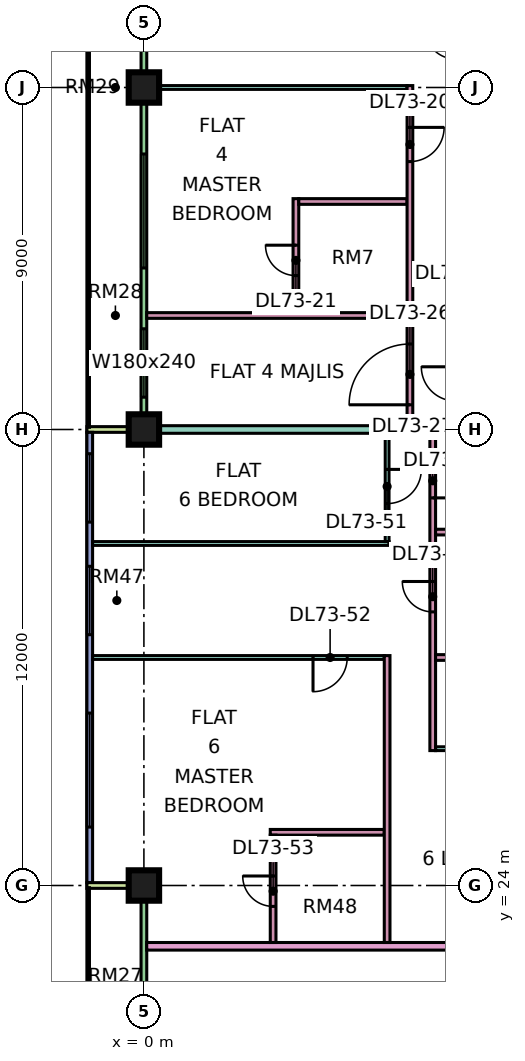
"""IFC4 building model, lengths in metres.
Left out: names, types, materials, properties, quantities, classifications, styles, units other than length and angle.
Written with IfcOpenShell. Run it as: python <this file> out.ifc"""

import sys

from ifc_helpers import new_model, si_unit, direction, frame, frame_2d, origin, origin_2d, place, context, subcontext, project, spatial, rectangle, extrude, element, fill, save


model = new_model("IFC4")
c1 = context("Model", 3, precision=1e-05, world=origin(), true_north=direction((0.0, 1.0)))
c2 = subcontext(c1, "Body", "Model", "MODEL_VIEW")
j1 = project(units=[si_unit("LENGTHUNIT", "METRE"), si_unit("PLANEANGLEUNIT", "RADIAN")], contexts=[c1])
p1 = place(None, origin())
s1 = spatial("IfcSite", under=j1, at=p1, CompositionType="ELEMENT")
p2 = place(p1, origin())
s2 = spatial("IfcBuilding", under=s1, at=p2, CompositionType="ELEMENT")
p3 = place(p2, frame((0.0, 0.0, 310.9)))
s3 = spatial("IfcBuildingStorey", under=s2, at=p3, CompositionType="ELEMENT", Elevation=310.9)
p4 = place(p3, frame((0.0, 24.0, 0.0), z_axis=(0.0, 0.0, 1.0), x_axis=(1.0, 0.0, 0.0)))
e1 = element("IfcColumn", 1, at=p4, inside=s3, PredefinedType="COLUMN", context=c2, shape_type="SweptSolid", body=[
    extrude(rectangle(XDim=0.8, YDim=0.8, at=origin_2d()), origin(), (0.0, 0.0, 1.0), 3.75),
])
p5 = place(p3, frame((0.0, 36.0, 0.0), z_axis=(0.0, 0.0, 1.0), x_axis=(1.0, 0.0, 0.0)))
e2 = element("IfcColumn", 2, at=p5, inside=s3, PredefinedType="COLUMN", context=c2, shape_type="SweptSolid", body=[
    extrude(rectangle(XDim=0.8, YDim=0.8, at=origin_2d()), origin(), (0.0, 0.0, 1.0), 3.75),
])
p6 = place(p3, frame((0.0, 45.0, 0.0), z_axis=(0.0, 0.0, 1.0), x_axis=(1.0, 0.0, 0.0)))
e3 = element("IfcColumn", 3, at=p6, inside=s3, PredefinedType="COLUMN", context=c2, shape_type="SweptSolid", body=[
    extrude(rectangle(XDim=0.8, YDim=0.8, at=origin_2d()), origin(), (0.0, 0.0, 1.0), 3.75),
])
p7 = place(p3, frame((0.0, 47.925, 0.0), z_axis=(0.0, 0.0, 1.0), x_axis=(0.0, -1.0, 0.0)))
e4 = element("IfcWall", 4, at=p7, inside=s3, PredefinedType="SOLIDWALL", context=c2, shape_type="SweptSolid", body=[
    extrude(rectangle(XDim=11.85, YDim=0.15, at=frame_2d((5.925, 0.0))), origin(), (0.0, 0.0, 1.0), 3.35),
])
p8 = place(p7, frame((0.613, 0.0, 0.0)))
e5 = element("IfcOpeningElement", 5, at=p8, cuts=e4, PredefinedType="OPENING", context=c2, shape_type="SweptSolid", body=[
    extrude(rectangle(XDim=1.2, YDim=2.4, at=frame_2d((0.6, 1.2))), frame((0.0, 0.085, 0.0), z_axis=(0.0, -1.0, 0.0), x_axis=(1.0, 0.0, 0.0)), (0.0, 0.0, 1.0), 0.17),
])
p9 = place(p7, frame((4.675, 0.0, 0.45)))
e6 = element("IfcOpeningElement", 6, at=p9, cuts=e4, PredefinedType="OPENING", context=c2, shape_type="SweptSolid", body=[
    extrude(rectangle(XDim=3.0, YDim=2.4, at=frame_2d((1.5, 1.2))), frame((0.0, 0.085, 0.0), z_axis=(0.0, -1.0, 0.0), x_axis=(1.0, 0.0, 0.0)), (0.0, 0.0, 1.0), 0.17),
])
p10 = place(p7, frame((9.275, 0.0, 0.45)))
e7 = element("IfcOpeningElement", 7, at=p10, cuts=e4, PredefinedType="OPENING", context=c2, shape_type="SweptSolid", body=[
    extrude(rectangle(XDim=1.8, YDim=2.4, at=frame_2d((0.9, 1.2))), frame((0.0, 0.085, 0.0), z_axis=(0.0, -1.0, 0.0), x_axis=(1.0, 0.0, 0.0)), (0.0, 0.0, 1.0), 0.17),
])
p11 = place(p3, frame((-1.5, 36.0, 0.0), z_axis=(0.0, 0.0, 1.0), x_axis=(1.0, 0.0, 0.0)))
e8 = element("IfcWall", 8, at=p11, inside=s3, PredefinedType="SOLIDWALL", context=c2, shape_type="SweptSolid", body=[
    extrude(rectangle(XDim=1.5, YDim=0.15, at=frame_2d((0.75, 0.0))), origin(), (0.0, 0.0, 1.0), 3.35),
])
p12 = place(p3, frame((-1.425, 35.925, 0.0), z_axis=(0.0, 0.0, 1.0), x_axis=(0.0, -1.0, 0.0)))
e9 = element("IfcWall", 9, at=p12, inside=s3, PredefinedType="SOLIDWALL", context=c2, shape_type="SweptSolid", body=[
    extrude(rectangle(XDim=11.85, YDim=0.15, at=frame_2d((5.925, 0.0))), origin(), (0.0, 0.0, 1.0), 3.35),
])
p13 = place(p12, frame((0.562, 0.0, 0.45)))
e10 = element("IfcOpeningElement", 10, at=p13, cuts=e9, PredefinedType="OPENING", context=c2, shape_type="SweptSolid", body=[
    extrude(rectangle(XDim=1.8, YDim=2.4, at=frame_2d((0.9, 1.2))), frame((0.0, 0.085, 0.0), z_axis=(0.0, -1.0, 0.0), x_axis=(1.0, 0.0, 0.0)), (0.0, 0.0, 1.0), 0.17),
])
p14 = place(p12, frame((3.525, 0.0, 0.45)))
e11 = element("IfcOpeningElement", 11, at=p14, cuts=e9, PredefinedType="OPENING", context=c2, shape_type="SweptSolid", body=[
    extrude(rectangle(XDim=1.8, YDim=2.4, at=frame_2d((0.9, 1.2))), frame((0.0, 0.085, 0.0), z_axis=(0.0, -1.0, 0.0), x_axis=(1.0, 0.0, 0.0)), (0.0, 0.0, 1.0), 0.17),
])
p15 = place(p12, frame((7.387, 0.0, 0.45)))
e12 = element("IfcOpeningElement", 12, at=p15, cuts=e9, PredefinedType="OPENING", context=c2, shape_type="SweptSolid", body=[
    extrude(rectangle(XDim=3.0, YDim=2.4, at=frame_2d((1.5, 1.2))), frame((0.0, 0.085, 0.0), z_axis=(0.0, -1.0, 0.0), x_axis=(1.0, 0.0, 0.0)), (0.0, 0.0, 1.0), 0.17),
])
p16 = place(p3, frame((0.0, 23.925, 0.0), z_axis=(0.0, 0.0, 1.0), x_axis=(0.0, -1.0, 0.0)))
e13 = element("IfcWall", 13, at=p16, inside=s3, PredefinedType="SOLIDWALL", context=c2, shape_type="SweptSolid", body=[
    extrude(rectangle(XDim=11.35, YDim=0.15, at=frame_2d((5.675, 0.0))), origin(), (0.0, 0.0, 1.0), 3.35),
])
p17 = place(p16, frame((6.738, 0.0, 0.0)))
e14 = element("IfcOpeningElement", 14, at=p17, cuts=e13, PredefinedType="OPENING", context=c2, shape_type="SweptSolid", body=[
    extrude(rectangle(XDim=1.8, YDim=2.4, at=frame_2d((0.9, 1.2))), frame((0.0, 0.085, 0.0), z_axis=(0.0, -1.0, 0.0), x_axis=(1.0, 0.0, 0.0)), (0.0, 0.0, 1.0), 0.17),
])
p18 = place(p3, frame((-1.5, 24.0, 0.0), z_axis=(0.0, 0.0, 1.0), x_axis=(1.0, 0.0, 0.0)))
e15 = element("IfcWall", 15, at=p18, inside=s3, PredefinedType="SOLIDWALL", context=c2, shape_type="SweptSolid", body=[
    extrude(rectangle(XDim=1.5, YDim=0.15, at=frame_2d((0.75, 0.0))), origin(), (0.0, 0.0, 1.0), 3.35),
])
p19 = place(p3, frame((-1.35, 30.0, 0.0), z_axis=(0.0, 0.0, 1.0), x_axis=(1.0, 0.0, 0.0)))
e16 = element("IfcWall", 16, at=p19, inside=s3, PredefinedType="PARTITIONING", context=c2, shape_type="SweptSolid", body=[
    extrude(rectangle(XDim=7.675, YDim=0.1, at=frame_2d((3.837, 0.0))), origin(), (0.0, 0.0, 1.0), 3.35),
])
p20 = place(p19, frame((5.8, 0.0, 0.0)))
e17 = element("IfcOpeningElement", 17, at=p20, cuts=e16, PredefinedType="OPENING", context=c2, shape_type="SweptSolid", body=[
    extrude(rectangle(XDim=0.9, YDim=2.1, at=frame_2d((0.45, 1.05))), frame((0.0, 0.06, 0.0), z_axis=(0.0, -1.0, 0.0), x_axis=(1.0, 0.0, 0.0)), (0.0, 0.0, 1.0), 0.12),
])
p21 = place(p3, frame((-1.35, 33.0, 0.0), z_axis=(0.0, 0.0, 1.0), x_axis=(1.0, 0.0, 0.0)))
e18 = element("IfcWall", 18, at=p21, inside=s3, PredefinedType="PARTITIONING", context=c2, shape_type="SweptSolid", body=[
    extrude(rectangle(XDim=7.8, YDim=0.1, at=frame_2d((3.9, 0.0))), origin(), (0.0, 0.0, 1.0), 3.35),
])
e19 = element("IfcWall", 19, at=p5, inside=s3, PredefinedType="PARTITIONING", context=c2, shape_type="SweptSolid", body=[
    extrude(rectangle(XDim=12.3, YDim=0.2, at=frame_2d((6.15, 0.0))), origin(), (0.0, 0.0, 1.0), 3.35),
])
p22 = place(p3, frame((0.074, 22.4, 0.0), z_axis=(0.0, 0.0, 1.0), x_axis=(1.0, 0.0, 0.0)))
e20 = element("IfcWall", 20, at=p22, inside=s3, PredefinedType="PARTITIONING", context=c2, shape_type="SweptSolid", body=[
    extrude(rectangle(XDim=12.226, YDim=0.2, at=frame_2d((6.113, 0.0))), origin(), (0.0, 0.0, 1.0), 3.35),
])
p23 = place(p3, frame((0.074, 39.0, 0.0), z_axis=(0.0, 0.0, 1.0), x_axis=(1.0, 0.0, 0.0)))
e21 = element("IfcWall", 21, at=p23, inside=s3, PredefinedType="PARTITIONING", context=c2, shape_type="SweptSolid", body=[
    extrude(rectangle(XDim=6.851, YDim=0.15, at=frame_2d((3.426, 0.0))), origin(), (0.0, 0.0, 1.0), 3.35),
])
p24 = place(p3, frame((0.074, 45.0, 0.0), z_axis=(0.0, 0.0, 1.0), x_axis=(1.0, 0.0, 0.0)))
e22 = element("IfcWall", 22, at=p24, inside=s3, PredefinedType="PARTITIONING", context=c2, shape_type="SweptSolid", body=[
    extrude(rectangle(XDim=6.851, YDim=0.1, at=frame_2d((3.426, 0.0))), origin(), (0.0, 0.0, 1.0), 3.35),
])
p25 = place(p3, frame((3.325, 25.4, 0.0), z_axis=(0.0, 0.0, 1.0), x_axis=(1.0, 0.0, 0.0)))
e23 = element("IfcWall", 23, at=p25, inside=s3, PredefinedType="PARTITIONING", context=c2, shape_type="SweptSolid", body=[
    extrude(rectangle(XDim=3.0, YDim=0.15, at=frame_2d((1.5, 0.0))), origin(), (0.0, 0.0, 1.0), 3.35),
])
p26 = place(p3, frame((3.4, 22.5, 0.0), z_axis=(0.0, 0.0, 1.0), x_axis=(0.0, 1.0, 0.0)))
e24 = element("IfcWall", 24, at=p26, inside=s3, PredefinedType="PARTITIONING", context=c2, shape_type="SweptSolid", body=[
    extrude(rectangle(XDim=2.825, YDim=0.15, at=frame_2d((1.413, 0.0))), origin(), (0.0, 0.0, 1.0), 3.35),
])
p27 = place(p26, frame((0.95, 0.0, 0.0)))
e25 = element("IfcOpeningElement", 25, at=p27, cuts=e24, PredefinedType="OPENING", context=c2, shape_type="SweptSolid", body=[
    extrude(rectangle(XDim=0.8, YDim=2.1, at=frame_2d((0.4, 1.05))), frame((0.0, 0.085, 0.0), z_axis=(0.0, -1.0, 0.0), x_axis=(1.0, 0.0, 0.0)), (0.0, 0.0, 1.0), 0.17),
])
p28 = place(p3, frame((4.0, 39.075, 0.0), z_axis=(0.0, 0.0, 1.0), x_axis=(0.0, 1.0, 0.0)))
e26 = element("IfcWall", 26, at=p28, inside=s3, PredefinedType="PARTITIONING", context=c2, shape_type="SweptSolid", body=[
    extrude(rectangle(XDim=3.0, YDim=0.15, at=frame_2d((1.5, 0.0))), origin(), (0.0, 0.0, 1.0), 3.35),
])
p29 = place(p28, frame((0.975, 0.0, 0.0)))
e27 = element("IfcOpeningElement", 27, at=p29, cuts=e26, PredefinedType="OPENING", context=c2, shape_type="SweptSolid", body=[
    extrude(rectangle(XDim=0.8, YDim=2.1, at=frame_2d((0.4, 1.05))), frame((0.0, 0.085, 0.0), z_axis=(0.0, -1.0, 0.0), x_axis=(1.0, 0.0, 0.0)), (0.0, 0.0, 1.0), 0.17),
])
p30 = place(p3, frame((4.075, 42.0, 0.0), z_axis=(0.0, 0.0, 1.0), x_axis=(1.0, 0.0, 0.0)))
e28 = element("IfcWall", 28, at=p30, inside=s3, PredefinedType="PARTITIONING", context=c2, shape_type="SweptSolid", body=[
    extrude(rectangle(XDim=2.85, YDim=0.15, at=frame_2d((1.425, 0.0))), origin(), (0.0, 0.0, 1.0), 3.35),
])
p31 = place(p3, frame((6.4, 22.5, 0.0), z_axis=(0.0, 0.0, 1.0), x_axis=(0.0, 1.0, 0.0)))
e29 = element("IfcWall", 29, at=p31, inside=s3, PredefinedType="PARTITIONING", context=c2, shape_type="SweptSolid", body=[
    extrude(rectangle(XDim=7.55, YDim=0.15, at=frame_2d((3.775, 0.0))), origin(), (0.0, 0.0, 1.0), 3.35),
])
p32 = place(p3, frame((6.4, 33.05, 0.0), z_axis=(0.0, 0.0, 1.0), x_axis=(0.0, 1.0, 0.0)))
e30 = element("IfcWall", 30, at=p32, inside=s3, PredefinedType="PARTITIONING", context=c2, shape_type="SweptSolid", body=[
    extrude(rectangle(XDim=2.85, YDim=0.1, at=frame_2d((1.425, 0.0))), origin(), (0.0, 0.0, 1.0), 3.35),
])
p33 = place(p32, frame((1.0, 0.0, 0.0)))
e31 = element("IfcOpeningElement", 31, at=p33, cuts=e30, PredefinedType="OPENING", context=c2, shape_type="SweptSolid", body=[
    extrude(rectangle(XDim=0.9, YDim=2.1, at=frame_2d((0.45, 1.05))), frame((0.0, 0.06, 0.0), z_axis=(0.0, -1.0, 0.0), x_axis=(1.0, 0.0, 0.0)), (0.0, 0.0, 1.0), 0.12),
])
p34 = place(p3, frame((7.0, 36.1, 0.0), z_axis=(0.0, 0.0, 1.0), x_axis=(0.0, 1.0, 0.0)))
e32 = element("IfcWall", 32, at=p34, inside=s3, PredefinedType="PARTITIONING", context=c2, shape_type="SweptSolid", body=[
    extrude(rectangle(XDim=8.95, YDim=0.15, at=frame_2d((4.475, 0.0))), origin(), (0.0, 0.0, 1.0), 3.35),
])
p35 = place(p34, frame((6.95, 0.0, 0.0)))
e33 = element("IfcOpeningElement", 33, at=p35, cuts=e32, PredefinedType="OPENING", context=c2, shape_type="SweptSolid", body=[
    extrude(rectangle(XDim=0.9, YDim=2.1, at=frame_2d((0.45, 1.05))), frame((0.0, 0.085, 0.0), z_axis=(0.0, -1.0, 0.0), x_axis=(1.0, 0.0, 0.0)), (0.0, 0.0, 1.0), 0.17),
])
p36 = place(p34, frame((0.55, 0.0, 0.0)))
e34 = element("IfcOpeningElement", 34, at=p36, cuts=e32, PredefinedType="OPENING", context=c2, shape_type="SweptSolid", body=[
    extrude(rectangle(XDim=1.6, YDim=2.1, at=frame_2d((0.8, 1.05))), frame((0.0, 0.085, 0.0), z_axis=(0.0, -1.0, 0.0), x_axis=(1.0, 0.0, 0.0)), (0.0, 0.0, 1.0), 0.17),
])
p37 = place(p3, frame((7.6, 27.55, 0.0), z_axis=(0.0, 0.0, 1.0), x_axis=(0.0, 1.0, 0.0)))
e35 = element("IfcWall", 35, at=p37, inside=s3, PredefinedType="PARTITIONING", context=c2, shape_type="SweptSolid", body=[
    extrude(rectangle(XDim=8.35, YDim=0.15, at=frame_2d((4.175, 0.0))), origin(), (0.0, 0.0, 1.0), 3.35),
])
p38 = place(p37, frame((3.65, 0.0, 0.0)))
e36 = element("IfcOpeningElement", 36, at=p38, cuts=e35, PredefinedType="OPENING", context=c2, shape_type="SweptSolid", body=[
    extrude(rectangle(XDim=0.8, YDim=2.1, at=frame_2d((0.4, 1.05))), frame((0.0, 0.085, 0.0), z_axis=(0.0, -1.0, 0.0), x_axis=(1.0, 0.0, 0.0)), (0.0, 0.0, 1.0), 0.17),
])
p39 = place(p37, frame((6.65, 0.0, 0.0)))
e37 = element("IfcOpeningElement", 37, at=p39, cuts=e35, PredefinedType="OPENING", context=c2, shape_type="SweptSolid", body=[
    extrude(rectangle(XDim=0.9, YDim=2.1, at=frame_2d((0.45, 1.05))), frame((0.0, 0.085, 0.0), z_axis=(0.0, -1.0, 0.0), x_axis=(1.0, 0.0, 0.0)), (0.0, 0.0, 1.0), 0.17),
])
p40 = place(p3, frame((7.675, 27.6, 0.0), z_axis=(0.0, 0.0, 1.0), x_axis=(1.0, 0.0, 0.0)))
e38 = element("IfcWall", 38, at=p40, inside=s3, PredefinedType="PARTITIONING", context=c2, shape_type="SweptSolid", body=[
    extrude(rectangle(XDim=4.625, YDim=0.1, at=frame_2d((2.312, 0.0))), origin(), (0.0, 0.0, 1.0), 3.35),
])
p41 = place(p40, frame((1.875, 0.0, 0.0)))
e39 = element("IfcOpeningElement", 39, at=p41, cuts=e38, PredefinedType="OPENING", context=c2, shape_type="SweptSolid", body=[
    extrude(rectangle(XDim=0.9, YDim=2.1, at=frame_2d((0.45, 1.05))), frame((0.0, 0.06, 0.0), z_axis=(0.0, -1.0, 0.0), x_axis=(1.0, 0.0, 0.0)), (0.0, 0.0, 1.0), 0.12),
])
for number, where, z_axis, x_axis in (
    (40, (7.675, 30.0, 0.0), (0.0, 0.0, 1.0), (1.0, 0.0, 0.0)),
    (41, (7.675, 33.3, 0.0), (0.0, 0.0, 1.0), (1.0, 0.0, 0.0)),
):
    element("IfcWall", number, at=place(p3, frame(where, z_axis=z_axis, x_axis=x_axis)), inside=s3, PredefinedType="PARTITIONING", context=c2, shape_type="SweptSolid", body=[
        extrude(rectangle(XDim=4.625, YDim=0.15, at=frame_2d((2.312, 0.0))), origin(), (0.0, 0.0, 1.0), 3.35),
    ])
p42 = place(p9, origin())
e42 = element("IfcWindow", 42, at=p42, inside=s3, PartitioningType="SINGLE_PANEL", PredefinedType="WINDOW", context=c2, shape_type="SweptSolid", body=[
    extrude(rectangle(XDim=3.0, YDim=2.4, at=frame_2d((1.5, 1.2))), frame((0.0, 0.03, 0.0), z_axis=(0.0, -1.0, 0.0), x_axis=(1.0, 0.0, 0.0)), (0.0, 0.0, 1.0), 0.06),
])
fill(e6, e42)
p43 = place(p10, origin())
e43 = element("IfcWindow", 43, at=p43, inside=s3, PartitioningType="SINGLE_PANEL", PredefinedType="WINDOW", context=c2, shape_type="SweptSolid", body=[
    extrude(rectangle(XDim=1.8, YDim=2.4, at=frame_2d((0.9, 1.2))), frame((0.0, 0.03, 0.0), z_axis=(0.0, -1.0, 0.0), x_axis=(1.0, 0.0, 0.0)), (0.0, 0.0, 1.0), 0.06),
])
fill(e7, e43)
p44 = place(p13, origin())
e44 = element("IfcWindow", 44, at=p44, inside=s3, PartitioningType="SINGLE_PANEL", PredefinedType="WINDOW", context=c2, shape_type="SweptSolid", body=[
    extrude(rectangle(XDim=1.8, YDim=2.4, at=frame_2d((0.9, 1.2))), frame((0.0, 0.03, 0.0), z_axis=(0.0, -1.0, 0.0), x_axis=(1.0, 0.0, 0.0)), (0.0, 0.0, 1.0), 0.06),
])
fill(e10, e44)
p45 = place(p14, origin())
e45 = element("IfcWindow", 45, at=p45, inside=s3, PartitioningType="SINGLE_PANEL", PredefinedType="WINDOW", context=c2, shape_type="SweptSolid", body=[
    extrude(rectangle(XDim=1.8, YDim=2.4, at=frame_2d((0.9, 1.2))), frame((0.0, 0.03, 0.0), z_axis=(0.0, -1.0, 0.0), x_axis=(1.0, 0.0, 0.0)), (0.0, 0.0, 1.0), 0.06),
])
fill(e11, e45)
p46 = place(p15, origin())
e46 = element("IfcWindow", 46, at=p46, inside=s3, PartitioningType="SINGLE_PANEL", PredefinedType="WINDOW", context=c2, shape_type="SweptSolid", body=[
    extrude(rectangle(XDim=3.0, YDim=2.4, at=frame_2d((1.5, 1.2))), frame((0.0, 0.03, 0.0), z_axis=(0.0, -1.0, 0.0), x_axis=(1.0, 0.0, 0.0)), (0.0, 0.0, 1.0), 0.06),
])
fill(e12, e46)
p47 = place(p35, origin())
e47 = element("IfcDoor", 47, at=p47, inside=s3, OperationType="SINGLE_SWING_RIGHT", PredefinedType="DOOR", context=c2, shape_type="SweptSolid", body=[
    extrude(rectangle(XDim=0.9, YDim=2.1, at=frame_2d((0.45, 1.05))), frame((0.0, 0.025, 0.0), z_axis=(0.0, -1.0, 0.0), x_axis=(1.0, 0.0, 0.0)), (0.0, 0.0, 1.0), 0.05),
])
fill(e33, e47)
p48 = place(p29, frame((0.8, 0.0, 0.0), z_axis=(0.0, 0.0, 1.0), x_axis=(-1.0, 0.0, 0.0)))
e48 = element("IfcDoor", 48, at=p48, inside=s3, OperationType="SINGLE_SWING_RIGHT", PredefinedType="DOOR", context=c2, shape_type="SweptSolid", body=[
    extrude(rectangle(XDim=0.8, YDim=2.1, at=frame_2d((0.4, 1.05))), frame((0.0, 0.025, 0.0), z_axis=(0.0, -1.0, 0.0), x_axis=(1.0, 0.0, 0.0)), (0.0, 0.0, 1.0), 0.05),
])
fill(e27, e48)
p49 = place(p36, origin())
e49 = element("IfcDoor", 49, at=p49, inside=s3, OperationType="DOUBLE_DOOR_SINGLE_SWING", PredefinedType="DOOR", context=c2, shape_type="SweptSolid", body=[
    extrude(rectangle(XDim=1.6, YDim=2.1, at=frame_2d((0.8, 1.05))), frame((0.0, 0.025, 0.0), z_axis=(0.0, -1.0, 0.0), x_axis=(1.0, 0.0, 0.0)), (0.0, 0.0, 1.0), 0.05),
])
fill(e34, e49)
p50 = place(p38, frame((0.8, 0.0, 0.0), z_axis=(0.0, 0.0, 1.0), x_axis=(-1.0, 0.0, 0.0)))
e50 = element("IfcDoor", 50, at=p50, inside=s3, OperationType="SINGLE_SWING_RIGHT", PredefinedType="DOOR", context=c2, shape_type="SweptSolid", body=[
    extrude(rectangle(XDim=0.8, YDim=2.1, at=frame_2d((0.4, 1.05))), frame((0.0, 0.025, 0.0), z_axis=(0.0, -1.0, 0.0), x_axis=(1.0, 0.0, 0.0)), (0.0, 0.0, 1.0), 0.05),
])
fill(e36, e50)
p51 = place(p33, origin())
e51 = element("IfcDoor", 51, at=p51, inside=s3, OperationType="SINGLE_SWING_RIGHT", PredefinedType="DOOR", context=c2, shape_type="SweptSolid", body=[
    extrude(rectangle(XDim=0.9, YDim=2.1, at=frame_2d((0.45, 1.05))), frame((0.0, 0.025, 0.0), z_axis=(0.0, -1.0, 0.0), x_axis=(1.0, 0.0, 0.0)), (0.0, 0.0, 1.0), 0.05),
])
fill(e31, e51)
p52 = place(p20, frame((0.9, 0.0, 0.0), z_axis=(0.0, 0.0, 1.0), x_axis=(-1.0, 0.0, 0.0)))
e52 = element("IfcDoor", 52, at=p52, inside=s3, OperationType="SINGLE_SWING_LEFT", PredefinedType="DOOR", context=c2, shape_type="SweptSolid", body=[
    extrude(rectangle(XDim=0.9, YDim=2.1, at=frame_2d((0.45, 1.05))), frame((0.0, 0.025, 0.0), z_axis=(0.0, -1.0, 0.0), x_axis=(1.0, 0.0, 0.0)), (0.0, 0.0, 1.0), 0.05),
])
fill(e17, e52)
p53 = place(p27, frame((0.8, 0.0, 0.0), z_axis=(0.0, 0.0, 1.0), x_axis=(-1.0, 0.0, 0.0)))
e53 = element("IfcDoor", 53, at=p53, inside=s3, OperationType="SINGLE_SWING_RIGHT", PredefinedType="DOOR", context=c2, shape_type="SweptSolid", body=[
    extrude(rectangle(XDim=0.8, YDim=2.1, at=frame_2d((0.4, 1.05))), frame((0.0, 0.025, 0.0), z_axis=(0.0, -1.0, 0.0), x_axis=(1.0, 0.0, 0.0)), (0.0, 0.0, 1.0), 0.05),
])
fill(e25, e53)
p54 = place(p39, frame((0.9, 0.0, 0.0), z_axis=(0.0, 0.0, 1.0), x_axis=(-1.0, 0.0, 0.0)))
e54 = element("IfcDoor", 54, at=p54, inside=s3, OperationType="SINGLE_SWING_LEFT", PredefinedType="DOOR", context=c2, shape_type="SweptSolid", body=[
    extrude(rectangle(XDim=0.9, YDim=2.1, at=frame_2d((0.45, 1.05))), frame((0.0, 0.025, 0.0), z_axis=(0.0, -1.0, 0.0), x_axis=(1.0, 0.0, 0.0)), (0.0, 0.0, 1.0), 0.05),
])
fill(e37, e54)
save(model, sys.argv[1])
